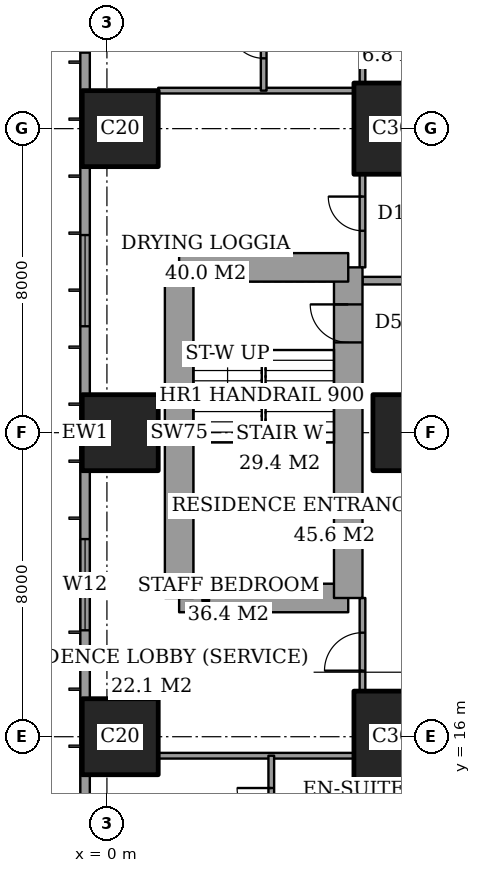
"""IFC4 building model, lengths in metres.
Left out: names, types, materials, properties, quantities, classifications, styles, units other than length and angle.
Written with IfcOpenShell. Run it as: python <this file> out.ifc"""

import sys

from ifc_helpers import new_model, si_unit, direction, frame, frame_2d, origin, origin_2d, place, context, subcontext, project, spatial, rectangle, extrude, element, fill, save


model = new_model("IFC4")
c1 = context("Model", 3, precision=1e-05, world=origin(), true_north=direction((0.0, 1.0)))
c2 = subcontext(c1, "Body", "Model", "MODEL_VIEW")
j1 = project(units=[si_unit("LENGTHUNIT", "METRE"), si_unit("PLANEANGLEUNIT", "RADIAN")], contexts=[c1])
p1 = place(None, origin())
s1 = spatial("IfcSite", under=j1, at=p1, CompositionType="ELEMENT")
p2 = place(p1, origin())
s2 = spatial("IfcBuilding", under=s1, at=p2, CompositionType="ELEMENT")
p3 = place(p2, frame((0.0, 0.0, 168.2)))
s3 = spatial("IfcBuildingStorey", under=s2, at=p3, CompositionType="ELEMENT", Elevation=168.2)
for number, where, z_axis, x_axis in (
    (1, (0.35, 16.0, 0.0), (0.0, 0.0, 1.0), (1.0, 0.0, 0.0)),
    (2, (0.35, 24.0, 0.0), (0.0, 0.0, 1.0), (1.0, 0.0, 0.0)),
    (3, (0.35, 32.0, 0.0), (0.0, 0.0, 1.0), (1.0, 0.0, 0.0)),
):
    element("IfcColumn", number, at=place(p3, frame(where, z_axis=z_axis, x_axis=x_axis)), inside=s3, PredefinedType="COLUMN", context=c2, shape_type="SweptSolid", body=[
        extrude(rectangle(XDim=2.0, YDim=2.0, at=origin_2d()), origin(), (0.0, 0.0, 1.0), 3.6),
    ])
p4 = place(p3, frame((8.0, 16.0, 0.0), z_axis=(0.0, 0.0, 1.0), x_axis=(1.0, 0.0, 0.0)))
e4 = element("IfcColumn", 4, at=p4, inside=s3, PredefinedType="COLUMN", context=c2, shape_type="SweptSolid", body=[
    extrude(rectangle(XDim=3.0, YDim=2.4, at=origin_2d()), origin(), (0.0, 0.0, 1.0), 3.6),
])
p5 = place(p3, frame((8.0, 24.0, 0.0), z_axis=(0.0, 0.0, 1.0), x_axis=(1.0, 0.0, 0.0)))
e5 = element("IfcColumn", 5, at=p5, inside=s3, PredefinedType="COLUMN", context=c2, shape_type="SweptSolid", body=[
    extrude(rectangle(XDim=2.0, YDim=2.0, at=origin_2d()), origin(), (0.0, 0.0, 1.0), 3.6),
])
p6 = place(p3, frame((8.0, 32.0, 0.0), z_axis=(0.0, 0.0, 1.0), x_axis=(1.0, 0.0, 0.0)))
e6 = element("IfcColumn", 6, at=p6, inside=s3, PredefinedType="COLUMN", context=c2, shape_type="SweptSolid", body=[
    extrude(rectangle(XDim=3.0, YDim=2.4, at=origin_2d()), origin(), (0.0, 0.0, 1.0), 3.6),
])
p7 = place(p3, frame((1.9, 19.65, 0.0), z_axis=(0.0, 0.0, 1.0), x_axis=(1.0, 0.0, 0.0)))
e7 = element("IfcWall", 7, at=p7, inside=s3, PredefinedType="SHEAR", context=c2, shape_type="SweptSolid", body=[
    extrude(rectangle(XDim=4.45, YDim=0.75, at=frame_2d((2.225, 0.0))), origin(), (0.0, 0.0, 1.0), 3.6),
])
p8 = place(p3, frame((6.35, 19.65, 0.0), z_axis=(0.0, 0.0, 1.0), x_axis=(0.0, 1.0, 0.0)))
e8 = element("IfcWall", 8, at=p8, inside=s3, PredefinedType="SHEAR", context=c2, shape_type="SweptSolid", body=[
    extrude(rectangle(XDim=8.7, YDim=0.75, at=frame_2d((4.35, 0.0))), origin(), (0.0, 0.0, 1.0), 3.6),
])
p9 = place(p8, frame((6.725, 0.0, 0.0)))
e9 = element("IfcOpeningElement", 9, at=p9, cuts=e8, PredefinedType="OPENING", context=c2, shape_type="SweptSolid", body=[
    extrude(rectangle(XDim=1.0, YDim=2.1, at=frame_2d((0.5, 1.05))), frame((0.0, 0.385, 0.0), z_axis=(0.0, -1.0, 0.0), x_axis=(1.0, 0.0, 0.0)), (0.0, 0.0, 1.0), 0.77),
])
p10 = place(p3, frame((6.35, 28.35, 0.0), z_axis=(0.0, 0.0, 1.0), x_axis=(-1.0, 0.0, 0.0)))
e10 = element("IfcWall", 10, at=p10, inside=s3, PredefinedType="SHEAR", context=c2, shape_type="SweptSolid", body=[
    extrude(rectangle(XDim=4.45, YDim=0.75, at=frame_2d((2.225, 0.0))), origin(), (0.0, 0.0, 1.0), 3.6),
])
p11 = place(p3, frame((1.9, 28.35, 0.0), z_axis=(0.0, 0.0, 1.0), x_axis=(0.0, -1.0, 0.0)))
e11 = element("IfcWall", 11, at=p11, inside=s3, PredefinedType="SHEAR", context=c2, shape_type="SweptSolid", body=[
    extrude(rectangle(XDim=8.7, YDim=0.75, at=frame_2d((4.35, 0.0))), origin(), (0.0, 0.0, 1.0), 3.6),
])
p12 = place(p3, frame((-0.575, 44.825, 0.0), z_axis=(0.0, 0.0, 1.0), x_axis=(0.0, -1.0, 0.0)))
e12 = element("IfcWall", 12, at=p12, inside=s3, PredefinedType="SOLIDWALL", context=c2, shape_type="SweptSolid", body=[
    extrude(rectangle(XDim=41.65, YDim=0.25, at=frame_2d((20.825, 0.0))), origin(), (0.0, 0.0, 1.0), 3.6),
])
p13 = place(p12, frame((0.775, 0.0, 0.4)))
e13 = element("IfcOpeningElement", 13, at=p13, cuts=e12, PredefinedType="OPENING", context=c2, shape_type="SweptSolid", body=[
    extrude(rectangle(XDim=2.4, YDim=2.2, at=frame_2d((1.2, 1.1))), frame((0.0, 0.135, 0.0), z_axis=(0.0, -1.0, 0.0), x_axis=(1.0, 0.0, 0.0)), (0.0, 0.0, 1.0), 0.27),
])
p14 = place(p12, frame((6.1, 0.0, 0.4)))
e14 = element("IfcOpeningElement", 14, at=p14, cuts=e12, PredefinedType="OPENING", context=c2, shape_type="SweptSolid", body=[
    extrude(rectangle(XDim=1.2, YDim=2.2, at=frame_2d((0.6, 1.1))), frame((0.0, 0.135, 0.0), z_axis=(0.0, -1.0, 0.0), x_axis=(1.0, 0.0, 0.0)), (0.0, 0.0, 1.0), 0.27),
])
p15 = place(p12, frame((8.425, 0.0, 0.4)))
e15 = element("IfcOpeningElement", 15, at=p15, cuts=e12, PredefinedType="OPENING", context=c2, shape_type="SweptSolid", body=[
    extrude(rectangle(XDim=2.4, YDim=2.2, at=frame_2d((1.2, 1.1))), frame((0.0, 0.135, 0.0), z_axis=(0.0, -1.0, 0.0), x_axis=(1.0, 0.0, 0.0)), (0.0, 0.0, 1.0), 0.27),
])
p16 = place(p12, frame((15.625, 0.0, 0.4)))
e16 = element("IfcOpeningElement", 16, at=p16, cuts=e12, PredefinedType="OPENING", context=c2, shape_type="SweptSolid", body=[
    extrude(rectangle(XDim=2.4, YDim=2.2, at=frame_2d((1.2, 1.1))), frame((0.0, 0.135, 0.0), z_axis=(0.0, -1.0, 0.0), x_axis=(1.0, 0.0, 0.0)), (0.0, 0.0, 1.0), 0.27),
])
p17 = place(p12, frame((23.625, 0.0, 0.4)))
e17 = element("IfcOpeningElement", 17, at=p17, cuts=e12, PredefinedType="OPENING", context=c2, shape_type="SweptSolid", body=[
    extrude(rectangle(XDim=2.4, YDim=2.2, at=frame_2d((1.2, 1.1))), frame((0.0, 0.135, 0.0), z_axis=(0.0, -1.0, 0.0), x_axis=(1.0, 0.0, 0.0)), (0.0, 0.0, 1.0), 0.27),
])
p18 = place(p12, frame((30.825, 0.0, 0.4)))
e18 = element("IfcOpeningElement", 18, at=p18, cuts=e12, PredefinedType="OPENING", context=c2, shape_type="SweptSolid", body=[
    extrude(rectangle(XDim=2.4, YDim=2.2, at=frame_2d((1.2, 1.1))), frame((0.0, 0.135, 0.0), z_axis=(0.0, -1.0, 0.0), x_axis=(1.0, 0.0, 0.0)), (0.0, 0.0, 1.0), 0.27),
])
p19 = place(p12, frame((34.5, 0.0, 0.4)))
e19 = element("IfcOpeningElement", 19, at=p19, cuts=e12, PredefinedType="OPENING", context=c2, shape_type="SweptSolid", body=[
    extrude(rectangle(XDim=1.2, YDim=2.2, at=frame_2d((0.6, 1.1))), frame((0.0, 0.135, 0.0), z_axis=(0.0, -1.0, 0.0), x_axis=(1.0, 0.0, 0.0)), (0.0, 0.0, 1.0), 0.27),
])
p20 = place(p12, frame((38.475, 0.0, 0.4)))
e20 = element("IfcOpeningElement", 20, at=p20, cuts=e12, PredefinedType="OPENING", context=c2, shape_type="SweptSolid", body=[
    extrude(rectangle(XDim=2.4, YDim=2.2, at=frame_2d((1.2, 1.1))), frame((0.0, 0.135, 0.0), z_axis=(0.0, -1.0, 0.0), x_axis=(1.0, 0.0, 0.0)), (0.0, 0.0, 1.0), 0.27),
])
p21 = place(p3, frame((1.35, 15.5, 0.0), z_axis=(0.0, 0.0, 1.0), x_axis=(1.0, 0.0, 0.0)))
e21 = element("IfcWall", 21, at=p21, inside=s3, PredefinedType="PARTITIONING", context=c2, shape_type="SweptSolid", body=[
    extrude(rectangle(XDim=5.15, YDim=0.15, at=frame_2d((2.575, 0.0))), origin(), (0.0, 0.0, 1.0), 3.25),
])
p22 = place(p3, frame((6.725, 28.0, 0.0), z_axis=(0.0, 0.0, 1.0), x_axis=(1.0, 0.0, 0.0)))
e22 = element("IfcWall", 22, at=p22, inside=s3, PredefinedType="PARTITIONING", context=c2, shape_type="SweptSolid", body=[
    extrude(rectangle(XDim=17.275, YDim=0.2, at=frame_2d((8.637, 0.0))), origin(), (0.0, 0.0, 1.0), 3.25),
])
p23 = place(p22, frame((6.875, 0.0, 0.0)))
e23 = element("IfcOpeningElement", 23, at=p23, cuts=e22, PredefinedType="OPENING", context=c2, shape_type="SweptSolid", body=[
    extrude(rectangle(XDim=1.2, YDim=2.4, at=frame_2d((0.6, 1.2))), frame((0.0, 0.11, 0.0), z_axis=(0.0, -1.0, 0.0), x_axis=(1.0, 0.0, 0.0)), (0.0, 0.0, 1.0), 0.22),
])
p24 = place(p3, frame((1.35, 33.0, 0.0), z_axis=(0.0, 0.0, 1.0), x_axis=(1.0, 0.0, 0.0)))
e24 = element("IfcWall", 24, at=p24, inside=s3, PredefinedType="PARTITIONING", context=c2, shape_type="SweptSolid", body=[
    extrude(rectangle(XDim=5.15, YDim=0.15, at=frame_2d((2.575, 0.0))), origin(), (0.0, 0.0, 1.0), 3.25),
])
p25 = place(p3, frame((4.125, 33.0, 0.0), z_axis=(0.0, 0.0, 1.0), x_axis=(0.0, 1.0, 0.0)))
e25 = element("IfcWall", 25, at=p25, inside=s3, PredefinedType="PARTITIONING", context=c2, shape_type="SweptSolid", body=[
    extrude(rectangle(XDim=2.6, YDim=0.15, at=frame_2d((1.3, 0.0))), origin(), (0.0, 0.0, 1.0), 3.25),
])
p26 = place(p25, frame((0.85, 0.0, 0.0)))
e26 = element("IfcOpeningElement", 26, at=p26, cuts=e25, PredefinedType="OPENING", context=c2, shape_type="SweptSolid", body=[
    extrude(rectangle(XDim=0.9, YDim=2.1, at=frame_2d((0.45, 1.05))), frame((0.0, 0.085, 0.0), z_axis=(0.0, -1.0, 0.0), x_axis=(1.0, 0.0, 0.0)), (0.0, 0.0, 1.0), 0.17),
])
p27 = place(p3, frame((4.325, 12.9, 0.0), z_axis=(0.0, 0.0, 1.0), x_axis=(0.0, 1.0, 0.0)))
e27 = element("IfcWall", 27, at=p27, inside=s3, PredefinedType="PARTITIONING", context=c2, shape_type="SweptSolid", body=[
    extrude(rectangle(XDim=2.6, YDim=0.15, at=frame_2d((1.3, 0.0))), origin(), (0.0, 0.0, 1.0), 3.25),
])
p28 = place(p27, frame((0.85, 0.0, 0.0)))
e28 = element("IfcOpeningElement", 28, at=p28, cuts=e27, PredefinedType="OPENING", context=c2, shape_type="SweptSolid", body=[
    extrude(rectangle(XDim=0.9, YDim=2.1, at=frame_2d((0.45, 1.05))), frame((0.0, 0.085, 0.0), z_axis=(0.0, -1.0, 0.0), x_axis=(1.0, 0.0, 0.0)), (0.0, 0.0, 1.0), 0.17),
])
p29 = place(p3, frame((6.725, 10.6, 0.0), z_axis=(0.0, 0.0, 1.0), x_axis=(0.0, 1.0, 0.0)))
e29 = element("IfcWall", 29, at=p29, inside=s3, PredefinedType="PARTITIONING", context=c2, shape_type="SweptSolid", body=[
    extrude(rectangle(XDim=4.2, YDim=0.15, at=frame_2d((2.1, 0.0))), origin(), (0.0, 0.0, 1.0), 3.25),
])
p30 = place(p3, frame((6.725, 17.2, 0.0), z_axis=(0.0, 0.0, 1.0), x_axis=(0.0, 1.0, 0.0)))
e30 = element("IfcWall", 30, at=p30, inside=s3, PredefinedType="PARTITIONING", context=c2, shape_type="SweptSolid", body=[
    extrude(rectangle(XDim=2.45, YDim=0.15, at=frame_2d((1.225, 0.0))), origin(), (0.0, 0.0, 1.0), 3.25),
])
p31 = place(p30, frame((0.538, 0.0, 0.0)))
e31 = element("IfcOpeningElement", 31, at=p31, cuts=e30, PredefinedType="OPENING", context=c2, shape_type="SweptSolid", body=[
    extrude(rectangle(XDim=1.0, YDim=2.1, at=frame_2d((0.5, 1.05))), frame((0.0, 0.085, 0.0), z_axis=(0.0, -1.0, 0.0), x_axis=(1.0, 0.0, 0.0)), (0.0, 0.0, 1.0), 0.17),
])
p32 = place(p3, frame((6.725, 28.35, 0.0), z_axis=(0.0, 0.0, 1.0), x_axis=(0.0, 1.0, 0.0)))
e32 = element("IfcWall", 32, at=p32, inside=s3, PredefinedType="PARTITIONING", context=c2, shape_type="SweptSolid", body=[
    extrude(rectangle(XDim=2.45, YDim=0.15, at=frame_2d((1.225, 0.0))), origin(), (0.0, 0.0, 1.0), 3.25),
])
p33 = place(p32, frame((0.962, 0.0, 0.0)))
e33 = element("IfcOpeningElement", 33, at=p33, cuts=e32, PredefinedType="OPENING", context=c2, shape_type="SweptSolid", body=[
    extrude(rectangle(XDim=0.9, YDim=2.1, at=frame_2d((0.45, 1.05))), frame((0.0, 0.085, 0.0), z_axis=(0.0, -1.0, 0.0), x_axis=(1.0, 0.0, 0.0)), (0.0, 0.0, 1.0), 0.17),
])
p34 = place(p3, frame((6.725, 33.2, 0.0), z_axis=(0.0, 0.0, 1.0), x_axis=(0.0, 1.0, 0.0)))
e34 = element("IfcWall", 34, at=p34, inside=s3, PredefinedType="PARTITIONING", context=c2, shape_type="SweptSolid", body=[
    extrude(rectangle(XDim=4.2, YDim=0.15, at=frame_2d((2.1, 0.0))), origin(), (0.0, 0.0, 1.0), 3.25),
])
p35 = place(p16, origin())
e35 = element("IfcWindow", 35, at=p35, inside=s3, PartitioningType="SINGLE_PANEL", PredefinedType="WINDOW", context=c2, shape_type="SweptSolid", body=[
    extrude(rectangle(XDim=2.4, YDim=2.2, at=frame_2d((1.2, 1.1))), frame((0.0, 0.03, 0.0), z_axis=(0.0, -1.0, 0.0), x_axis=(1.0, 0.0, 0.0)), (0.0, 0.0, 1.0), 0.06),
])
fill(e16, e35)
p36 = place(p17, origin())
e36 = element("IfcWindow", 36, at=p36, inside=s3, PartitioningType="SINGLE_PANEL", PredefinedType="WINDOW", context=c2, shape_type="SweptSolid", body=[
    extrude(rectangle(XDim=2.4, YDim=2.2, at=frame_2d((1.2, 1.1))), frame((0.0, 0.03, 0.0), z_axis=(0.0, -1.0, 0.0), x_axis=(1.0, 0.0, 0.0)), (0.0, 0.0, 1.0), 0.06),
])
fill(e17, e36)
p37 = place(p28, origin())
e37 = element("IfcDoor", 37, at=p37, inside=s3, OperationType="SINGLE_SWING_LEFT", PredefinedType="DOOR", context=c2, shape_type="SweptSolid", body=[
    extrude(rectangle(XDim=0.9, YDim=2.1, at=frame_2d((0.45, 1.05))), frame((0.0, 0.025, 0.0), z_axis=(0.0, -1.0, 0.0), x_axis=(1.0, 0.0, 0.0)), (0.0, 0.0, 1.0), 0.05),
])
fill(e28, e37)
p38 = place(p31, origin())
e38 = element("IfcDoor", 38, at=p38, inside=s3, OperationType="SINGLE_SWING_RIGHT", PredefinedType="DOOR", context=c2, shape_type="SweptSolid", body=[
    extrude(rectangle(XDim=1.0, YDim=2.1, at=frame_2d((0.5, 1.05))), frame((0.0, 0.025, 0.0), z_axis=(0.0, -1.0, 0.0), x_axis=(1.0, 0.0, 0.0)), (0.0, 0.0, 1.0), 0.05),
])
fill(e31, e38)
p39 = place(p26, origin())
e39 = element("IfcDoor", 39, at=p39, inside=s3, OperationType="SINGLE_SWING_LEFT", PredefinedType="DOOR", context=c2, shape_type="SweptSolid", body=[
    extrude(rectangle(XDim=0.9, YDim=2.1, at=frame_2d((0.45, 1.05))), frame((0.0, 0.025, 0.0), z_axis=(0.0, -1.0, 0.0), x_axis=(1.0, 0.0, 0.0)), (0.0, 0.0, 1.0), 0.05),
])
fill(e26, e39)
p40 = place(p33, origin())
e40 = element("IfcDoor", 40, at=p40, inside=s3, OperationType="SINGLE_SWING_LEFT", PredefinedType="DOOR", context=c2, shape_type="SweptSolid", body=[
    extrude(rectangle(XDim=0.9, YDim=2.1, at=frame_2d((0.45, 1.05))), frame((0.0, 0.025, 0.0), z_axis=(0.0, -1.0, 0.0), x_axis=(1.0, 0.0, 0.0)), (0.0, 0.0, 1.0), 0.05),
])
fill(e33, e40)
p41 = place(p9, origin())
e41 = element("IfcDoor", 41, at=p41, inside=s3, OperationType="SINGLE_SWING_LEFT", PredefinedType="DOOR", context=c2, shape_type="SweptSolid", body=[
    extrude(rectangle(XDim=1.0, YDim=2.1, at=frame_2d((0.5, 1.05))), frame((0.0, 0.025, 0.0), z_axis=(0.0, -1.0, 0.0), x_axis=(1.0, 0.0, 0.0)), (0.0, 0.0, 1.0), 0.05),
])
fill(e9, e41)
save(model, sys.argv[1])
